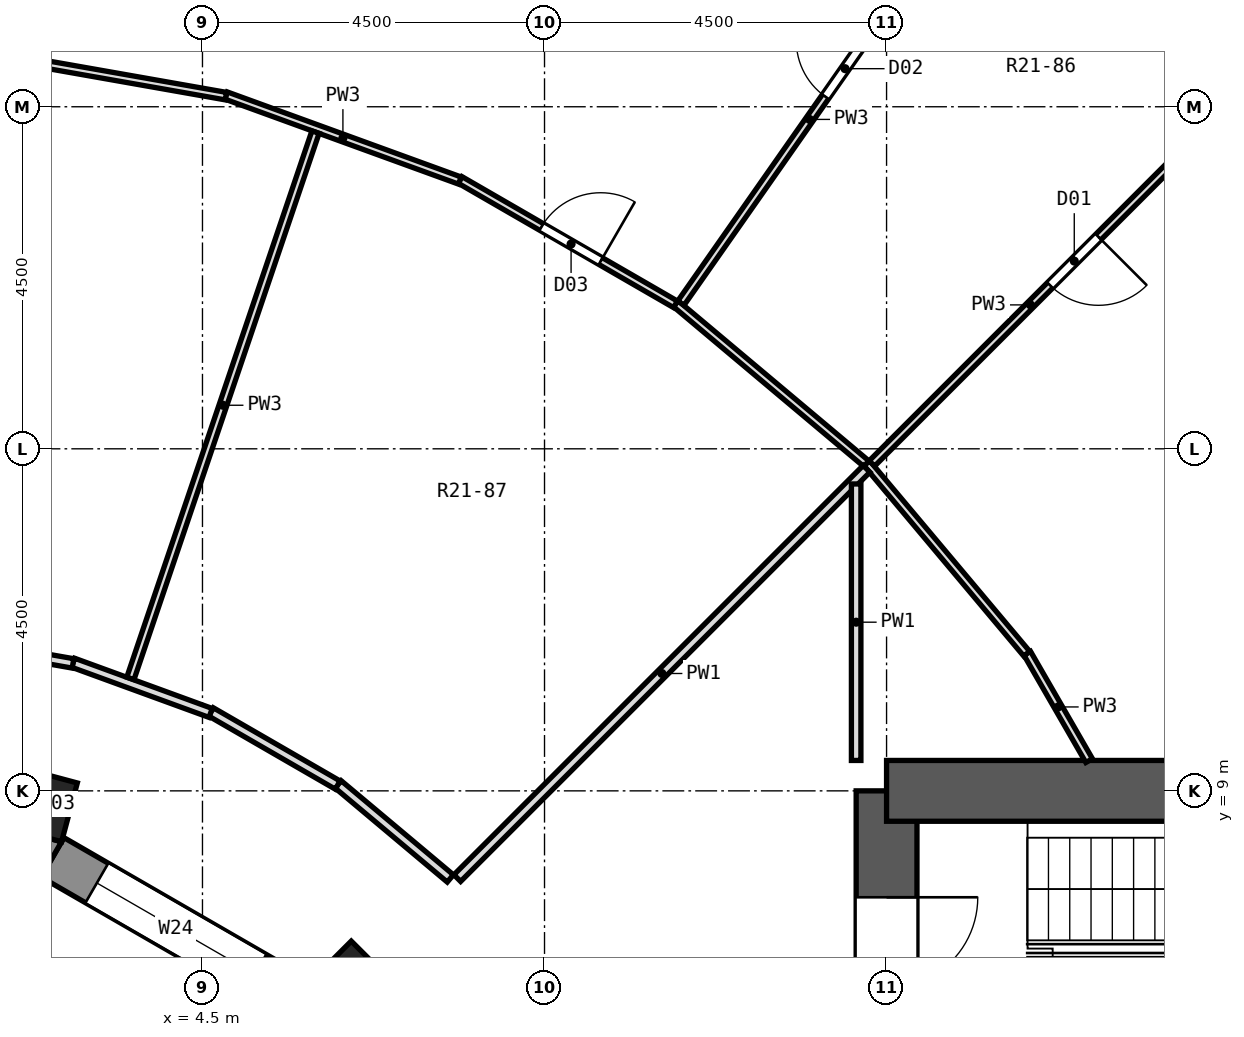
"""IFC4 building model, lengths in metres.
Left out: names, types, materials, properties, quantities, classifications, styles, units other than length and angle.
Written with IfcOpenShell. Run it as: python <this file> out.ifc"""

import sys

from ifc_helpers import new_model, si_unit, direction, frame, frame_2d, origin, origin_2d, place, context, subcontext, project, spatial, polyline, rectangle, outline, extrude, element, fill, save


model = new_model("IFC4")
c1 = context("Model", 3, precision=1e-05, world=origin(), true_north=direction((0.0, 1.0)))
c2 = subcontext(c1, "Body", "Model", "MODEL_VIEW")
j1 = project(units=[si_unit("LENGTHUNIT", "METRE"), si_unit("PLANEANGLEUNIT", "RADIAN")], contexts=[c1])
p1 = place(None, origin())
s1 = spatial("IfcSite", under=j1, at=p1, CompositionType="ELEMENT")
p2 = place(p1, origin())
s2 = spatial("IfcBuilding", under=s1, at=p2, CompositionType="ELEMENT")
p3 = place(p2, frame((0.0, 0.0, 131.5)))
s3 = spatial("IfcBuildingStorey", under=s2, at=p3, CompositionType="ELEMENT", Elevation=131.5)
for number, where, z_axis, x_axis in (
    (1, (6.458, 6.458, 0.0), (0.0, 0.0, 1.0), (0.707, 0.707, 0.0)),
    (2, (2.364, 8.821, 0.0), (0.0, 0.0, 1.0), (0.259, 0.966, 0.0)),
):
    element("IfcColumn", number, at=place(p3, frame(where, z_axis=z_axis, x_axis=x_axis)), inside=s3, PredefinedType="COLUMN", context=c2, shape_type="SweptSolid", body=[
        extrude(rectangle(XDim=0.8, YDim=0.8, at=origin_2d()), origin(), (0.0, 0.0, 1.0), 3.3),
    ])
p4 = place(p3, frame((13.5, -9.0, 0.0), z_axis=(0.0, 0.0, 1.0), x_axis=(0.0, 1.0, 0.0)))
e3 = element("IfcWall", 3, at=p4, inside=s3, PredefinedType="SHEAR", context=c2, shape_type="SweptSolid", body=[
    extrude(rectangle(XDim=18.0, YDim=0.8, at=frame_2d((9.0, 0.0))), origin(), (0.0, 0.0, 1.0), 3.3),
])
p5 = place(p4, frame((15.4, 0.0, 0.0)))
e4 = element("IfcOpeningElement", 4, at=p5, cuts=e3, PredefinedType="OPENING", context=c2, shape_type="SweptSolid", body=[
    extrude(rectangle(XDim=1.2, YDim=2.1, at=frame_2d((0.6, 1.05))), frame((0.0, 0.412, 0.0), z_axis=(0.0, -1.0, 0.0), x_axis=(1.0, 0.0, 0.0)), (0.0, 0.0, 1.0), 0.824),
])
p6 = place(p4, frame((1.4, 0.0, 0.0)))
e5 = element("IfcOpeningElement", 5, at=p6, cuts=e3, PredefinedType="OPENING", context=c2, shape_type="SweptSolid", body=[
    extrude(rectangle(XDim=1.2, YDim=2.1, at=frame_2d((0.6, 1.05))), frame((0.0, 0.412, 0.0), z_axis=(0.0, -1.0, 0.0), x_axis=(1.0, 0.0, 0.0)), (0.0, 0.0, 1.0), 0.824),
])
p7 = place(p4, frame((7.5, 0.0, 0.0)))
e6 = element("IfcOpeningElement", 6, at=p7, cuts=e3, PredefinedType="OPENING", context=c2, shape_type="SweptSolid", body=[
    extrude(rectangle(XDim=3.0, YDim=2.4, at=frame_2d((1.5, 1.2))), frame((0.0, 0.412, 0.0), z_axis=(0.0, -1.0, 0.0), x_axis=(1.0, 0.0, 0.0)), (0.0, 0.0, 1.0), 0.824),
])
p8 = place(p3, frame((13.5, 9.0, 0.0), z_axis=(0.0, 0.0, 1.0), x_axis=(1.0, 0.0, 0.0)))
e7 = element("IfcWall", 7, at=p8, inside=s3, PredefinedType="SHEAR", context=c2, shape_type="SweptSolid", body=[
    extrude(rectangle(XDim=10.4, YDim=0.8, at=frame_2d((5.2, 0.0))), origin(), (0.0, 0.0, 1.0), 3.3),
])
p9 = place(p3, frame((5.773, 6.251, 0.0), z_axis=(0.0, 0.0, 1.0), x_axis=(-0.86604563398, 0.499964958637, 0.0)))
e8 = element("IfcWall", 8, at=p9, inside=s3, PredefinedType="SOLIDWALL", context=c2, shape_type="SweptSolid", body=[
    extrude(rectangle(XDim=3.747, YDim=0.6, at=frame_2d((1.874, 0.0))), origin(), (0.0, 0.0, 1.0), 2.8),
])
p10 = place(p9, frame((0.674, 0.0, 0.9)))
e9 = element("IfcOpeningElement", 9, at=p10, cuts=e8, PredefinedType="OPENING", context=c2, shape_type="SweptSolid", body=[
    extrude(rectangle(XDim=2.4, YDim=1.8, at=frame_2d((1.2, 0.9))), frame((0.0, 0.312, 0.0), z_axis=(0.0, -1.0, 0.0), x_axis=(1.0, 0.0, 0.0)), (0.0, 0.0, 1.0), 0.624),
])
p11 = place(p3, origin())
e10 = element("IfcWall", 10, at=p11, inside=s3, PredefinedType="SOLIDWALL", context=c2, shape_type="SweptSolid", body=[
    extrude(outline(polyline([(1.874, 8.538), (1.874, 8.0), (2.377, 7.865), (2.646, 8.331), (1.874, 8.538)])), origin(), (0.0, 0.0, 1.0), 2.8),
])
p12 = place(p3, frame((15.351, 10.81, 0.0), z_axis=(0.0, 0.0, 1.0), x_axis=(0.499618727529, -0.866245419672, 0.0)))
e11 = element("IfcWall", 11, at=p12, inside=s3, PredefinedType="PARTITIONING", context=c2, shape_type="SweptSolid", body=[
    extrude(rectangle(XDim=1.63, YDim=0.1, at=frame_2d((0.815, 0.0))), origin(), (0.0, 0.0, 1.0), 2.8),
])
p13 = place(p3, frame((13.239, 13.311, 0.0), z_axis=(0.0, 0.0, 1.0), x_axis=(0.643004881109, -0.76586207823, 0.0)))
e12 = element("IfcWall", 12, at=p13, inside=s3, PredefinedType="PARTITIONING", context=c2, shape_type="SweptSolid", body=[
    extrude(rectangle(XDim=3.273, YDim=0.1, at=frame_2d((1.636, 0.0))), origin(), (0.0, 0.0, 1.0), 2.8),
])
p14 = place(p3, frame((6.284, 9.086, 0.0), z_axis=(0.0, 0.0, 1.0), x_axis=(0.766243876147, -0.642549859752, 0.0)))
e13 = element("IfcWall", 13, at=p14, inside=s3, PredefinedType="PARTITIONING", context=c2, shape_type="SweptSolid", body=[
    extrude(rectangle(XDim=1.926, YDim=0.125, at=frame_2d((0.963, 0.0))), origin(), (0.0, 0.0, 1.0), 2.8),
])
p15 = place(p3, frame((10.727, 15.409, 0.0), z_axis=(0.0, 0.0, 1.0), x_axis=(0.76586207823, -0.643004881109, 0.0)))
e14 = element("IfcWall", 14, at=p15, inside=s3, PredefinedType="PARTITIONING", context=c2, shape_type="SweptSolid", body=[
    extrude(rectangle(XDim=3.273, YDim=0.1, at=frame_2d((1.636, 0.0))), origin(), (0.0, 0.0, 1.0), 2.8),
])
p16 = place(p3, frame((4.612, 10.039, 0.0), z_axis=(0.0, 0.0, 1.0), x_axis=(0.865978590021, -0.500081075052, 0.0)))
e15 = element("IfcWall", 15, at=p16, inside=s3, PredefinedType="PARTITIONING", context=c2, shape_type="SweptSolid", body=[
    extrude(rectangle(XDim=1.925, YDim=0.125, at=frame_2d((0.962, 0.0))), origin(), (0.0, 0.0, 1.0), 2.8),
])
p17 = place(p3, frame((7.889, 17.037, 0.0), z_axis=(0.0, 0.0, 1.0), x_axis=(0.866002935623, -0.500038913978, 0.0)))
e16 = element("IfcWall", 16, at=p17, inside=s3, PredefinedType="PARTITIONING", context=c2, shape_type="SweptSolid", body=[
    extrude(rectangle(XDim=3.272, YDim=0.1, at=frame_2d((1.636, 0.0))), origin(), (0.0, 0.0, 1.0), 2.8),
])
p18 = place(p17, frame((1.237, 0.0, 0.0)))
e17 = element("IfcOpeningElement", 17, at=p18, cuts=e16, PredefinedType="OPENING", context=c2, shape_type="SweptSolid", body=[
    extrude(rectangle(XDim=0.9, YDim=2.1, at=frame_2d((0.45, 1.05))), frame((0.0, 0.062, 0.0), z_axis=(0.0, -1.0, 0.0), x_axis=(1.0, 0.0, 0.0)), (0.0, 0.0, 1.0), 0.124),
])
p19 = place(p3, frame((2.798, 10.686, 0.0), z_axis=(0.0, 0.0, 1.0), x_axis=(0.939367042811, -0.34291334019, 0.0)))
e18 = element("IfcWall", 18, at=p19, inside=s3, PredefinedType="PARTITIONING", context=c2, shape_type="SweptSolid", body=[
    extrude(rectangle(XDim=1.926, YDim=0.125, at=frame_2d((0.963, 0.0))), origin(), (0.0, 0.0, 1.0), 2.8),
])
p20 = place(p3, frame((4.81, 18.148, 0.0), z_axis=(0.0, 0.0, 1.0), x_axis=(0.939747677998, -0.341868836979, 0.0)))
e19 = element("IfcWall", 19, at=p20, inside=s3, PredefinedType="PARTITIONING", context=c2, shape_type="SweptSolid", body=[
    extrude(rectangle(XDim=3.273, YDim=0.1, at=frame_2d((1.636, 0.0))), origin(), (0.0, 0.0, 1.0), 2.8),
])
p21 = place(p3, frame((0.899, 11.011, 0.0), z_axis=(0.0, 0.0, 1.0), x_axis=(0.984830733923, -0.173517795977, 0.0)))
e20 = element("IfcWall", 20, at=p21, inside=s3, PredefinedType="PARTITIONING", context=c2, shape_type="SweptSolid", body=[
    extrude(rectangle(XDim=1.926, YDim=0.125, at=frame_2d((0.963, 0.0))), origin(), (0.0, 0.0, 1.0), 2.8),
])
p22 = place(p3, frame((1.586, 18.708, 0.0), z_axis=(0.0, 0.0, 1.0), x_axis=(0.984816586048, -0.17359807558, 0.0)))
e21 = element("IfcWall", 21, at=p22, inside=s3, PredefinedType="PARTITIONING", context=c2, shape_type="SweptSolid", body=[
    extrude(rectangle(XDim=3.273, YDim=0.1, at=frame_2d((1.636, 0.0))), origin(), (0.0, 0.0, 1.0), 2.8),
])
p23 = place(p3, frame((13.307, 13.307, 0.0), z_axis=(0.0, 0.0, 1.0), x_axis=(0.707106781187, 0.707106781187, 0.0)))
e22 = element("IfcWall", 22, at=p23, inside=s3, PredefinedType="PARTITIONING", context=c2, shape_type="SweptSolid", body=[
    extrude(rectangle(XDim=6.846, YDim=0.1, at=frame_2d((3.423, 0.0))), origin(), (0.0, 0.0, 1.0), 2.8),
])
p24 = place(p23, frame((3.315, 0.0, 0.0)))
e23 = element("IfcOpeningElement", 23, at=p24, cuts=e22, PredefinedType="OPENING", context=c2, shape_type="SweptSolid", body=[
    extrude(rectangle(XDim=0.9, YDim=2.1, at=frame_2d((0.45, 1.05))), frame((0.0, 0.062, 0.0), z_axis=(0.0, -1.0, 0.0), x_axis=(1.0, 0.0, 0.0)), (0.0, 0.0, 1.0), 0.124),
])
p25 = place(p3, frame((7.852, 7.852, 0.0), z_axis=(0.0, 0.0, 1.0), x_axis=(0.707106781187, 0.707106781187, 0.0)))
e24 = element("IfcWall", 24, at=p25, inside=s3, PredefinedType="PARTITIONING", context=c2, shape_type="SweptSolid", body=[
    extrude(rectangle(XDim=7.615, YDim=0.125, at=frame_2d((3.807, 0.0))), origin(), (0.0, 0.0, 1.0), 2.8),
])
p26 = place(p3, frame((10.795, 15.417, 0.0), z_axis=(0.0, 0.0, 1.0), x_axis=(0.573553308079, 0.819168238393, 0.0)))
e25 = element("IfcWall", 25, at=p26, inside=s3, PredefinedType="PARTITIONING", context=c2, shape_type="SweptSolid", body=[
    extrude(rectangle(XDim=6.845, YDim=0.1, at=frame_2d((3.422, 0.0))), origin(), (0.0, 0.0, 1.0), 2.8),
])
p27 = place(p26, frame((3.315, 0.0, 0.0)))
e26 = element("IfcOpeningElement", 26, at=p27, cuts=e25, PredefinedType="OPENING", context=c2, shape_type="SweptSolid", body=[
    extrude(rectangle(XDim=0.9, YDim=2.1, at=frame_2d((0.45, 1.05))), frame((0.0, 0.062, 0.0), z_axis=(0.0, -1.0, 0.0), x_axis=(1.0, 0.0, 0.0)), (0.0, 0.0, 1.0), 0.124),
])
p28 = place(p3, frame((3.552, 10.48, 0.0), z_axis=(0.0, 0.0, 1.0), x_axis=(0.320895480421, 0.947114613257, 0.0)))
e27 = element("IfcWall", 27, at=p28, inside=s3, PredefinedType="PARTITIONING", context=c2, shape_type="SweptSolid", body=[
    extrude(rectangle(XDim=7.588, YDim=0.1, at=frame_2d((3.794, 0.0))), origin(), (0.0, 0.0, 1.0), 2.8),
])
p29 = place(p3, frame((13.1, 9.4, 0.0), z_axis=(0.0, 0.0, 1.0), x_axis=(0.0, 1.0, 0.0)))
e28 = element("IfcWall", 28, at=p29, inside=s3, PredefinedType="PARTITIONING", context=c2, shape_type="SweptSolid", body=[
    extrude(rectangle(XDim=3.638, YDim=0.125, at=frame_2d((1.819, 0.0))), origin(), (0.0, 0.0, 1.0), 2.8),
])
p30 = place(p10, origin())
e29 = element("IfcWindow", 29, at=p30, inside=s3, PartitioningType="SINGLE_PANEL", PredefinedType="WINDOW", context=c2, shape_type="SweptSolid", body=[
    extrude(rectangle(XDim=2.4, YDim=1.8, at=frame_2d((1.2, 0.9))), frame((0.0, -0.12, 0.0), z_axis=(0.0, -1.0, 0.0), x_axis=(1.0, 0.0, 0.0)), (0.0, 0.0, 1.0), 0.06),
])
fill(e9, e29)
p31 = place(p24, frame((0.9, 0.0, 0.0), z_axis=(0.0, 0.0, 1.0), x_axis=(-1.0, 0.0, 0.0)))
e30 = element("IfcDoor", 30, at=p31, inside=s3, OperationType="SINGLE_SWING_LEFT", PredefinedType="DOOR", context=c2, shape_type="SweptSolid", body=[
    extrude(rectangle(XDim=0.9, YDim=2.1, at=frame_2d((0.45, 1.05))), frame((0.0, 0.025, 0.0), z_axis=(0.0, -1.0, 0.0), x_axis=(1.0, 0.0, 0.0)), (0.0, 0.0, 1.0), 0.05),
])
fill(e23, e30)
p32 = place(p27, origin())
e31 = element("IfcDoor", 31, at=p32, inside=s3, OperationType="SINGLE_SWING_RIGHT", PredefinedType="DOOR", context=c2, shape_type="SweptSolid", body=[
    extrude(rectangle(XDim=0.9, YDim=2.1, at=frame_2d((0.45, 1.05))), frame((0.0, 0.025, 0.0), z_axis=(0.0, -1.0, 0.0), x_axis=(1.0, 0.0, 0.0)), (0.0, 0.0, 1.0), 0.05),
])
fill(e26, e31)
p33 = place(p18, origin())
e32 = element("IfcDoor", 32, at=p33, inside=s3, OperationType="SINGLE_SWING_RIGHT", PredefinedType="DOOR", context=c2, shape_type="SweptSolid", body=[
    extrude(rectangle(XDim=0.9, YDim=2.1, at=frame_2d((0.45, 1.05))), frame((0.0, 0.025, 0.0), z_axis=(0.0, -1.0, 0.0), x_axis=(1.0, 0.0, 0.0)), (0.0, 0.0, 1.0), 0.05),
])
fill(e17, e32)
p34 = place(p5, frame((1.2, 0.0, 0.0), z_axis=(0.0, 0.0, 1.0), x_axis=(-1.0, 0.0, 0.0)))
e33 = element("IfcDoor", 33, at=p34, inside=s3, OperationType="SINGLE_SWING_LEFT", PredefinedType="DOOR", context=c2, shape_type="SweptSolid", body=[
    extrude(rectangle(XDim=1.2, YDim=2.1, at=frame_2d((0.6, 1.05))), frame((0.0, 0.025, 0.0), z_axis=(0.0, -1.0, 0.0), x_axis=(1.0, 0.0, 0.0)), (0.0, 0.0, 1.0), 0.05),
])
fill(e4, e33)
save(model, sys.argv[1])
